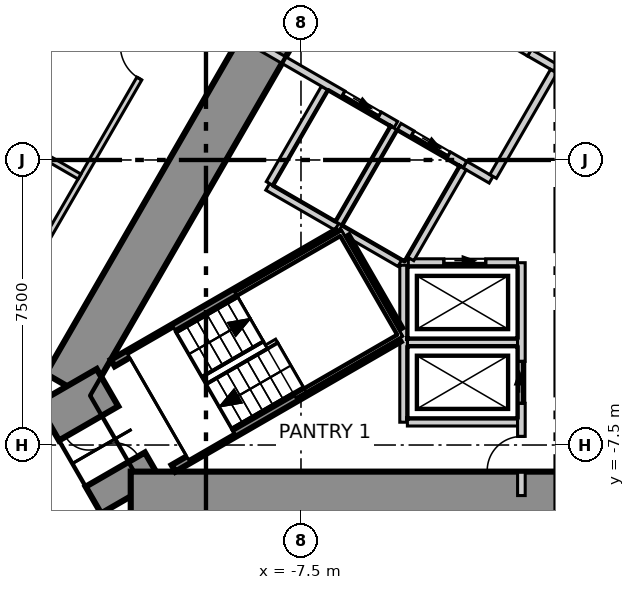
"""IFC4 building model, lengths in metres.
Left out: names, types, materials, properties, quantities, classifications, styles, units other than length and angle.
Written with IfcOpenShell. Run it as: python <this file> out.ifc"""

import sys

from ifc_helpers import new_model, si_unit, direction, frame, frame_2d, origin, place, context, subcontext, project, spatial, polyline, rectangle, outline, extrude, element, fill, save


model = new_model("IFC4")
c1 = context("Model", 3, precision=1e-05, world=origin(), true_north=direction((0.0, 1.0)))
c2 = subcontext(c1, "Body", "Model", "MODEL_VIEW")
j1 = project(units=[si_unit("LENGTHUNIT", "METRE"), si_unit("PLANEANGLEUNIT", "RADIAN")], contexts=[c1])
p1 = place(None, origin())
s1 = spatial("IfcSite", under=j1, at=p1, CompositionType="ELEMENT")
p2 = place(p1, origin())
s2 = spatial("IfcBuilding", under=s1, at=p2, CompositionType="ELEMENT")
p3 = place(p2, frame((0.0, 0.0, 99.8)))
s3 = spatial("IfcBuildingStorey", under=s2, at=p3, CompositionType="ELEMENT", Elevation=99.8)
p4 = place(p3, frame((-1.674, 14.8, -0.6), z_axis=(0.0, 0.0, 1.0), x_axis=(-0.499998822509, -0.866026083608, 0.0)))
e1 = element("IfcWall", 1, at=p4, inside=s3, PredefinedType="SHEAR", context=c2, shape_type="SweptSolid", body=[
    extrude(outline(polyline([(-0.664, -0.65), (1.281, -0.65), (3.226, -0.65), (5.172, -0.65), (7.117, -0.65), (9.062, -0.65), (11.007, -0.65), (12.953, -0.65), (14.898, -0.65), (16.843, -0.65), (18.788, -0.65), (20.734, -0.65), (22.679, -0.65), (24.624, -0.65), (23.296, 0.65), (21.41, 0.65), (19.524, 0.65), (17.638, 0.65), (15.752, 0.65), (13.866, 0.65), (11.98, 0.65), (10.094, 0.65), (8.208, 0.65), (6.322, 0.65), (4.436, 0.65), (2.55, 0.65), (0.664, 0.65), (-0.664, -0.65)])), origin(), (0.0, 0.0, 1.0), 4.8),
])
p5 = place(p4, frame((11.719, 0.0, 0.6)))
e2 = element("IfcOpeningElement", 2, at=p5, cuts=e1, PredefinedType="OPENING", context=c2, shape_type="SweptSolid", body=[
    extrude(rectangle(XDim=1.1, YDim=2.1, at=frame_2d((0.55, 1.05))), frame((0.0, 0.66, 0.0), z_axis=(0.0, -1.0, 0.0), x_axis=(1.0, 0.0, 0.0)), (0.0, 0.0, 1.0), 1.32),
])
p6 = place(p3, frame((-13.654, -5.95, -0.6), z_axis=(0.0, 0.0, 1.0), x_axis=(0.499926515799, -0.866067825751, 0.0)))
e3 = element("IfcWall", 3, at=p6, inside=s3, PredefinedType="SHEAR", context=c2, shape_type="SweptSolid", body=[
    extrude(outline(polyline([(-0.231, -0.9), (1.674, -0.9), (3.579, -0.9), (3.117, 0.9), (1.674, 0.9), (0.231, 0.9), (-0.231, -0.9)])), origin(), (0.0, 0.0, 1.0), 4.8),
])
p7 = place(p6, frame((1.134, 0.0, 0.6)))
e4 = element("IfcOpeningElement", 4, at=p7, cuts=e3, PredefinedType="OPENING", context=c2, shape_type="SweptSolid", body=[
    extrude(rectangle(XDim=1.4, YDim=2.1, at=frame_2d((0.7, 1.05))), frame((0.0, 0.91, 0.0), z_axis=(0.0, -1.0, 0.0), x_axis=(1.0, 0.0, 0.0)), (0.0, 0.0, 1.0), 1.82),
])
p8 = place(p3, frame((-11.98, -8.85, -0.6), z_axis=(0.0, 0.0, 1.0), x_axis=(1.0, 0.0, 0.0)))
e5 = element("IfcWall", 5, at=p8, inside=s3, PredefinedType="SHEAR", context=c2, shape_type="SweptSolid", body=[
    extrude(outline(polyline([(-0.664, -0.65), (1.281, -0.65), (3.226, -0.65), (5.172, -0.65), (7.117, -0.65), (9.062, -0.65), (11.007, -0.65), (12.953, -0.65), (14.898, -0.65), (16.843, -0.65), (18.788, -0.65), (20.734, -0.65), (22.679, -0.65), (24.624, -0.65), (23.296, 0.65), (21.41, 0.65), (19.524, 0.65), (17.638, 0.65), (15.752, 0.65), (13.866, 0.65), (11.98, 0.65), (10.094, 0.65), (8.208, 0.65), (6.322, 0.65), (4.436, 0.65), (2.55, 0.65), (0.664, 0.65), (-0.664, -0.65)])), origin(), (0.0, 0.0, 1.0), 4.8),
])
p9 = place(p3, frame((-3.217, 35.882, 0.0), z_axis=(0.0, 0.0, 1.0), x_axis=(-0.499995323711, -0.866028103624, 0.0)))
e6 = element("IfcWall", 6, at=p9, inside=s3, PredefinedType="ELEMENTEDWALL", context=c2, shape_type="SweptSolid", body=[
    extrude(rectangle(XDim=58.913, YDim=0.2, at=frame_2d((29.456, 0.0))), origin(), (0.0, 0.0, 1.0), 4.2),
])
p10 = place(p9, frame((2.023, 0.0, 0.6)))
e7 = element("IfcOpeningElement", 7, at=p10, cuts=e6, PredefinedType="OPENING", context=c2, shape_type="SweptSolid", body=[
    extrude(rectangle(XDim=5.6, YDim=3.0, at=frame_2d((2.8, 1.5))), frame((0.0, 0.11, 0.0), z_axis=(0.0, -1.0, 0.0), x_axis=(1.0, 0.0, 0.0)), (0.0, 0.0, 1.0), 0.22),
])
p11 = place(p9, frame((9.064, 0.0, 0.6)))
e8 = element("IfcOpeningElement", 8, at=p11, cuts=e6, PredefinedType="OPENING", context=c2, shape_type="SweptSolid", body=[
    extrude(rectangle(XDim=5.6, YDim=3.0, at=frame_2d((2.8, 1.5))), frame((0.0, 0.11, 0.0), z_axis=(0.0, -1.0, 0.0), x_axis=(1.0, 0.0, 0.0)), (0.0, 0.0, 1.0), 0.22),
])
p12 = place(p9, frame((16.105, 0.0, 0.6)))
e9 = element("IfcOpeningElement", 9, at=p12, cuts=e6, PredefinedType="OPENING", context=c2, shape_type="SweptSolid", body=[
    extrude(rectangle(XDim=5.6, YDim=3.0, at=frame_2d((2.8, 1.5))), frame((0.0, 0.11, 0.0), z_axis=(0.0, -1.0, 0.0), x_axis=(1.0, 0.0, 0.0)), (0.0, 0.0, 1.0), 0.22),
])
p13 = place(p9, frame((23.146, 0.0, 0.6)))
e10 = element("IfcOpeningElement", 10, at=p13, cuts=e6, PredefinedType="OPENING", context=c2, shape_type="SweptSolid", body=[
    extrude(rectangle(XDim=5.6, YDim=3.0, at=frame_2d((2.8, 1.5))), frame((0.0, 0.11, 0.0), z_axis=(0.0, -1.0, 0.0), x_axis=(1.0, 0.0, 0.0)), (0.0, 0.0, 1.0), 0.22),
])
p14 = place(p9, frame((30.186, 0.0, 0.6)))
e11 = element("IfcOpeningElement", 11, at=p14, cuts=e6, PredefinedType="OPENING", context=c2, shape_type="SweptSolid", body=[
    extrude(rectangle(XDim=5.6, YDim=3.0, at=frame_2d((2.8, 1.5))), frame((0.0, 0.11, 0.0), z_axis=(0.0, -1.0, 0.0), x_axis=(1.0, 0.0, 0.0)), (0.0, 0.0, 1.0), 0.22),
])
p15 = place(p9, frame((37.227, 0.0, 0.6)))
e12 = element("IfcOpeningElement", 12, at=p15, cuts=e6, PredefinedType="OPENING", context=c2, shape_type="SweptSolid", body=[
    extrude(rectangle(XDim=5.6, YDim=3.0, at=frame_2d((2.8, 1.5))), frame((0.0, 0.11, 0.0), z_axis=(0.0, -1.0, 0.0), x_axis=(1.0, 0.0, 0.0)), (0.0, 0.0, 1.0), 0.22),
])
p16 = place(p9, frame((44.268, 0.0, 0.6)))
e13 = element("IfcOpeningElement", 13, at=p16, cuts=e6, PredefinedType="OPENING", context=c2, shape_type="SweptSolid", body=[
    extrude(rectangle(XDim=5.6, YDim=3.0, at=frame_2d((2.8, 1.5))), frame((0.0, 0.11, 0.0), z_axis=(0.0, -1.0, 0.0), x_axis=(1.0, 0.0, 0.0)), (0.0, 0.0, 1.0), 0.22),
])
p17 = place(p9, frame((51.309, 0.0, 0.6)))
e14 = element("IfcOpeningElement", 14, at=p17, cuts=e6, PredefinedType="OPENING", context=c2, shape_type="SweptSolid", body=[
    extrude(rectangle(XDim=5.6, YDim=3.0, at=frame_2d((2.8, 1.5))), frame((0.0, 0.11, 0.0), z_axis=(0.0, -1.0, 0.0), x_axis=(1.0, 0.0, 0.0)), (0.0, 0.0, 1.0), 0.22),
])
p18 = place(p3, frame((-16.57, -6.2, 0.0), z_axis=(0.0, 0.0, 1.0), x_axis=(0.499993827443, 0.866028967483, 0.0)))
e15 = element("IfcWall", 15, at=p18, inside=s3, PredefinedType="PARTITIONING", context=c2, shape_type="SweptSolid", body=[
    extrude(rectangle(XDim=27.308, YDim=0.15, at=frame_2d((13.654, 0.0))), origin(), (0.0, 0.0, 1.0), 4.2),
])
p19 = place(p18, frame((23.402, 0.0, 0.0)))
e16 = element("IfcOpeningElement", 16, at=p19, cuts=e15, PredefinedType="OPENING", context=c2, shape_type="SweptSolid", body=[
    extrude(rectangle(XDim=1.2, YDim=2.1, at=frame_2d((0.6, 1.05))), frame((0.0, 0.085, 0.0), z_axis=(0.0, -1.0, 0.0), x_axis=(1.0, 0.0, 0.0)), (0.0, 0.0, 1.0), 0.17),
])
p20 = place(p18, frame((16.675, 0.0, 0.0)))
e17 = element("IfcOpeningElement", 17, at=p20, cuts=e15, PredefinedType="OPENING", context=c2, shape_type="SweptSolid", body=[
    extrude(rectangle(XDim=1.0, YDim=2.1, at=frame_2d((0.5, 1.05))), frame((0.0, 0.085, 0.0), z_axis=(0.0, -1.0, 0.0), x_axis=(1.0, 0.0, 0.0)), (0.0, 0.0, 1.0), 0.17),
])
p21 = place(p18, frame((9.634, 0.0, 0.0)))
e18 = element("IfcOpeningElement", 18, at=p21, cuts=e15, PredefinedType="OPENING", context=c2, shape_type="SweptSolid", body=[
    extrude(rectangle(XDim=1.0, YDim=2.1, at=frame_2d((0.5, 1.05))), frame((0.0, 0.085, 0.0), z_axis=(0.0, -1.0, 0.0), x_axis=(1.0, 0.0, 0.0)), (0.0, 0.0, 1.0), 0.17),
])
p22 = place(p18, frame((2.707, 0.0, 0.0)))
e19 = element("IfcOpeningElement", 19, at=p22, cuts=e15, PredefinedType="OPENING", context=c2, shape_type="SweptSolid", body=[
    extrude(rectangle(XDim=1.2, YDim=2.1, at=frame_2d((0.6, 1.05))), frame((0.0, 0.085, 0.0), z_axis=(0.0, -1.0, 0.0), x_axis=(1.0, 0.0, 0.0)), (0.0, 0.0, 1.0), 0.17),
])
p23 = place(p3, frame((-21.47, 4.266, 0.0), z_axis=(0.0, 0.0, 1.0), x_axis=(0.866010015463, -0.500026652407, 0.0)))
e20 = element("IfcWall", 20, at=p23, inside=s3, PredefinedType="PARTITIONING", context=c2, shape_type="SweptSolid", body=[
    extrude(rectangle(XDim=9.402, YDim=0.15, at=frame_2d((4.701, 0.0))), origin(), (0.0, 0.0, 1.0), 4.2),
])
p24 = place(p3, frame((-8.376, -0.707, 0.0), z_axis=(0.0, 0.0, 1.0), x_axis=(0.866067520717, -0.499927044236, 0.0)))
e21 = element("IfcWall", 21, at=p24, inside=s3, PredefinedType="SOLIDWALL", context=c2, shape_type="SweptSolid", body=[
    extrude(rectangle(XDim=2.1, YDim=0.2, at=frame_2d((1.05, 0.0))), origin(), (0.0, 0.0, 1.0), 4.2),
])
p25 = place(p3, frame((-8.326, -0.62, 0.0), z_axis=(0.0, 0.0, 1.0), x_axis=(0.500023687443, 0.866011727401, 0.0)))
e22 = element("IfcWall", 22, at=p25, inside=s3, PredefinedType="SOLIDWALL", context=c2, shape_type="SweptSolid", body=[
    extrude(rectangle(XDim=2.9, YDim=0.2, at=frame_2d((1.45, 0.0))), origin(), (0.0, 0.0, 1.0), 4.2),
])
p26 = place(p3, frame((-4.7, -4.8, 0.0), z_axis=(0.0, 0.0, 1.0), x_axis=(1.0, 0.0, 0.0)))
e23 = element("IfcWall", 23, at=p26, inside=s3, PredefinedType="SOLIDWALL", context=c2, shape_type="SweptSolid", body=[
    extrude(rectangle(XDim=2.9, YDim=0.2, at=frame_2d((1.45, 0.0))), origin(), (0.0, 0.0, 1.0), 4.2),
])
p27 = place(p3, frame((-4.8, -6.9, 0.0), z_axis=(0.0, 0.0, 1.0), x_axis=(0.0, 1.0, 0.0)))
e24 = element("IfcWall", 24, at=p27, inside=s3, PredefinedType="SOLIDWALL", context=c2, shape_type="SweptSolid", body=[
    extrude(rectangle(XDim=4.131, YDim=0.2, at=frame_2d((2.065, 0.0))), origin(), (0.0, 0.0, 1.0), 4.2),
])
p28 = place(p3, frame((-4.7, -6.9, 0.0), z_axis=(0.0, 0.0, 1.0), x_axis=(1.0, 0.0, 0.0)))
e25 = element("IfcWall", 25, at=p28, inside=s3, PredefinedType="SOLIDWALL", context=c2, shape_type="SweptSolid", body=[
    extrude(rectangle(XDim=2.9, YDim=0.2, at=frame_2d((1.45, 0.0))), origin(), (0.0, 0.0, 1.0), 4.2),
])
p29 = place(p3, frame((-1.7, -8.83, 0.0), z_axis=(0.0, 0.0, 1.0), x_axis=(0.0, 1.0, 0.0)))
e26 = element("IfcWall", 26, at=p29, inside=s3, PredefinedType="SOLIDWALL", context=c2, shape_type="SweptSolid", body=[
    extrude(rectangle(XDim=6.127, YDim=0.2, at=frame_2d((3.063, 0.0))), origin(), (0.0, 0.0, 1.0), 4.2),
])
p30 = place(p29, frame((2.43, 0.0, 0.0)))
e27 = element("IfcOpeningElement", 27, at=p30, cuts=e26, PredefinedType="OPENING", context=c2, shape_type="SweptSolid", body=[
    extrude(rectangle(XDim=1.1, YDim=2.1, at=frame_2d((0.55, 1.05))), frame((0.0, 0.11, 0.0), z_axis=(0.0, -1.0, 0.0), x_axis=(1.0, 0.0, 0.0)), (0.0, 0.0, 1.0), 0.22),
])
p31 = place(p29, frame((0.655, 0.0, 0.0)))
e28 = element("IfcOpeningElement", 28, at=p31, cuts=e26, PredefinedType="OPENING", context=c2, shape_type="SweptSolid", body=[
    extrude(rectangle(XDim=0.9, YDim=2.1, at=frame_2d((0.45, 1.05))), frame((0.0, 0.11, 0.0), z_axis=(0.0, -1.0, 0.0), x_axis=(1.0, 0.0, 0.0)), (0.0, 0.0, 1.0), 0.22),
])
p32 = place(p3, frame((-4.676, -2.7, 0.0), z_axis=(0.0, 0.0, 1.0), x_axis=(1.0, 0.0, 0.0)))
e29 = element("IfcWall", 29, at=p32, inside=s3, PredefinedType="SOLIDWALL", context=c2, shape_type="SweptSolid", body=[
    extrude(rectangle(XDim=2.873, YDim=0.2, at=frame_2d((1.437, 0.0))), origin(), (0.0, 0.0, 1.0), 4.2),
])
p33 = place(p32, frame((0.937, 0.0, 0.0)))
e30 = element("IfcOpeningElement", 30, at=p33, cuts=e29, PredefinedType="OPENING", context=c2, shape_type="SweptSolid", body=[
    extrude(rectangle(XDim=1.1, YDim=2.1, at=frame_2d((0.55, 1.05))), frame((0.0, 0.11, 0.0), z_axis=(0.0, -1.0, 0.0), x_axis=(1.0, 0.0, 0.0)), (0.0, 0.0, 1.0), 0.22),
])
p34 = place(p3, frame((-8.497, 2.943, 0.0), z_axis=(0.0, 0.0, 1.0), x_axis=(0.866036368755, -0.499981007633, 0.0)))
e31 = element("IfcWall", 31, at=p34, inside=s3, PredefinedType="SOLIDWALL", context=c2, shape_type="SweptSolid", body=[
    extrude(rectangle(XDim=4.032, YDim=0.2, at=frame_2d((2.016, 0.0))), origin(), (0.0, 0.0, 1.0), 4.2),
])
p35 = place(p34, frame((2.43, 0.0, 0.0)))
e32 = element("IfcOpeningElement", 32, at=p35, cuts=e31, PredefinedType="OPENING", context=c2, shape_type="SweptSolid", body=[
    extrude(rectangle(XDim=1.1, YDim=2.1, at=frame_2d((0.55, 1.05))), frame((0.0, 0.11, 0.0), z_axis=(0.0, -1.0, 0.0), x_axis=(1.0, 0.0, 0.0)), (0.0, 0.0, 1.0), 0.22),
])
p36 = place(p3, frame((-3.188, -0.122, 0.0), z_axis=(0.0, 0.0, 1.0), x_axis=(0.865705793592, -0.50055317294, 0.0)))
e33 = element("IfcWall", 33, at=p36, inside=s3, PredefinedType="SOLIDWALL", context=c2, shape_type="SweptSolid", body=[
    extrude(rectangle(XDim=0.797, YDim=0.2, at=frame_2d((0.398, 0.0))), origin(), (0.0, 0.0, 1.0), 4.2),
])
p37 = place(p3, frame((-1.488, 2.822, 0.0), z_axis=(0.0, 0.0, 1.0), x_axis=(0.866236612152, -0.499633997809, 0.0)))
e34 = element("IfcWall", 34, at=p37, inside=s3, PredefinedType="SOLIDWALL", context=c2, shape_type="SweptSolid", body=[
    extrude(rectangle(XDim=0.796, YDim=0.2, at=frame_2d((0.398, 0.0))), origin(), (0.0, 0.0, 1.0), 4.2),
])
p38 = place(p3, frame((-2.444, -0.433, 0.0), z_axis=(0.0, 0.0, 1.0), x_axis=(0.500035624827, 0.866004834804, 0.0)))
e35 = element("IfcWall", 35, at=p38, inside=s3, PredefinedType="SOLIDWALL", context=c2, shape_type="SweptSolid", body=[
    extrude(rectangle(XDim=3.194, YDim=0.2, at=frame_2d((1.597, 0.0))), origin(), (0.0, 0.0, 1.0), 4.2),
])
p39 = place(p3, frame((-6.507, -1.67, 0.0), z_axis=(0.0, 0.0, 1.0), x_axis=(0.50012328804, 0.865954211699, 0.0)))
e36 = element("IfcWall", 36, at=p39, inside=s3, PredefinedType="SOLIDWALL", context=c2, shape_type="SweptSolid", body=[
    extrude(rectangle(XDim=2.9, YDim=0.2, at=frame_2d((1.45, 0.0))), origin(), (0.0, 0.0, 1.0), 4.2),
])
p40 = place(p3, frame((-6.47, -1.807, 0.0), z_axis=(0.0, 0.0, 1.0), x_axis=(0.865883195159, -0.500246231712, 0.0)))
e37 = element("IfcWall", 37, at=p40, inside=s3, PredefinedType="SOLIDWALL", context=c2, shape_type="SweptSolid", body=[
    extrude(rectangle(XDim=1.815, YDim=0.2, at=frame_2d((0.908, 0.0))), origin(), (0.0, 0.0, 1.0), 4.2),
])
p41 = place(p3, frame((-4.92, 0.878, 0.0), z_axis=(0.0, 0.0, 1.0), x_axis=(0.866010750942, -0.50002537861, 0.0)))
e38 = element("IfcWall", 38, at=p41, inside=s3, PredefinedType="SOLIDWALL", context=c2, shape_type="SweptSolid", body=[
    extrude(rectangle(XDim=2.0, YDim=0.2, at=frame_2d((1.0, 0.0))), origin(), (0.0, 0.0, 1.0), 4.2),
])
p42 = place(p41, frame((0.4, 0.0, 0.0)))
e39 = element("IfcOpeningElement", 39, at=p42, cuts=e38, PredefinedType="OPENING", context=c2, shape_type="SweptSolid", body=[
    extrude(rectangle(XDim=1.1, YDim=2.1, at=frame_2d((0.55, 1.05))), frame((0.0, 0.11, 0.0), z_axis=(0.0, -1.0, 0.0), x_axis=(1.0, 0.0, 0.0)), (0.0, 0.0, 1.0), 0.22),
])
p43 = place(p3, frame((-4.619, -2.6, 0.0), z_axis=(0.0, 0.0, 1.0), x_axis=(0.50009492287, 0.865970593103, 0.0)))
e40 = element("IfcWall", 40, at=p43, inside=s3, PredefinedType="SOLIDWALL", context=c2, shape_type="SweptSolid", body=[
    extrude(rectangle(XDim=2.761, YDim=0.2, at=frame_2d((1.381, 0.0))), origin(), (0.0, 0.0, 1.0), 4.2),
])
p44 = place(p3, frame((-3.309, 3.873, 0.0), z_axis=(0.0, 0.0, 1.0), x_axis=(0.866098583652, -0.499873227325, 0.0)))
e41 = element("IfcWall", 41, at=p44, inside=s3, PredefinedType="SOLIDWALL", context=c2, shape_type="SweptSolid", body=[
    extrude(rectangle(XDim=2.103, YDim=0.2, at=frame_2d((1.051, 0.0))), origin(), (0.0, 0.0, 1.0), 4.2),
])
p45 = place(p44, frame((0.502, 0.0, 0.0)))
e42 = element("IfcOpeningElement", 42, at=p45, cuts=e41, PredefinedType="OPENING", context=c2, shape_type="SweptSolid", body=[
    extrude(rectangle(XDim=1.1, YDim=2.1, at=frame_2d((0.55, 1.05))), frame((0.0, 0.11, 0.0), z_axis=(0.0, -1.0, 0.0), x_axis=(1.0, 0.0, 0.0)), (0.0, 0.0, 1.0), 0.22),
])
p46 = place(p3, frame((-12.452, -5.342, 0.0), z_axis=(0.0, 0.0, 1.0), x_axis=(0.866002488145, 0.500039688951, 0.0)))
e43 = element("IfcWall", 43, at=p46, inside=s3, PredefinedType="SOLIDWALL", context=c2, shape_type="SweptSolid", body=[
    extrude(rectangle(XDim=6.839, YDim=0.2, at=frame_2d((3.42, 0.0))), origin(), (0.0, 0.0, 1.0), 4.2),
])
p47 = place(p3, frame((-6.329, -2.038, 0.0), z_axis=(0.0, 0.0, 1.0), x_axis=(0.500200581029, -0.865909567298, 0.0)))
e44 = element("IfcWall", 44, at=p47, inside=s3, PredefinedType="SOLIDWALL", context=c2, shape_type="SweptSolid", body=[
    extrude(rectangle(XDim=2.799, YDim=0.2, at=frame_2d((1.399, 0.0))), origin(), (0.0, 0.0, 1.0), 4.2),
])
p48 = place(p3, frame((-10.853, -8.113, 0.0), z_axis=(0.0, 0.0, 1.0), x_axis=(0.866047105788, 0.499962409144, 0.0)))
e45 = element("IfcWall", 45, at=p48, inside=s3, PredefinedType="SOLIDWALL", context=c2, shape_type="SweptSolid", body=[
    extrude(rectangle(XDim=6.84, YDim=0.2, at=frame_2d((3.42, 0.0))), origin(), (0.0, 0.0, 1.0), 4.2),
])
p49 = place(p33, origin())
e46 = element("IfcDoor", 46, at=p49, inside=s3, OperationType="SLIDING_TO_LEFT", PredefinedType="DOOR", context=c2, shape_type="SweptSolid", body=[
    extrude(rectangle(XDim=1.1, YDim=2.1, at=frame_2d((0.55, 1.05))), frame((0.0, 0.025, 0.0), z_axis=(0.0, -1.0, 0.0), x_axis=(1.0, 0.0, 0.0)), (0.0, 0.0, 1.0), 0.05),
])
fill(e30, e46)
p50 = place(p30, origin())
e47 = element("IfcDoor", 47, at=p50, inside=s3, OperationType="SLIDING_TO_LEFT", PredefinedType="DOOR", context=c2, shape_type="SweptSolid", body=[
    extrude(rectangle(XDim=1.1, YDim=2.1, at=frame_2d((0.55, 1.05))), frame((0.0, 0.025, 0.0), z_axis=(0.0, -1.0, 0.0), x_axis=(1.0, 0.0, 0.0)), (0.0, 0.0, 1.0), 0.05),
])
fill(e27, e47)
p51 = place(p42, origin())
e48 = element("IfcDoor", 48, at=p51, inside=s3, OperationType="SLIDING_TO_LEFT", PredefinedType="DOOR", context=c2, shape_type="SweptSolid", body=[
    extrude(rectangle(XDim=1.1, YDim=2.1, at=frame_2d((0.55, 1.05))), frame((0.0, 0.025, 0.0), z_axis=(0.0, -1.0, 0.0), x_axis=(1.0, 0.0, 0.0)), (0.0, 0.0, 1.0), 0.05),
])
fill(e39, e48)
p52 = place(p35, origin())
e49 = element("IfcDoor", 49, at=p52, inside=s3, OperationType="SLIDING_TO_LEFT", PredefinedType="DOOR", context=c2, shape_type="SweptSolid", body=[
    extrude(rectangle(XDim=1.1, YDim=2.1, at=frame_2d((0.55, 1.05))), frame((0.0, 0.025, 0.0), z_axis=(0.0, -1.0, 0.0), x_axis=(1.0, 0.0, 0.0)), (0.0, 0.0, 1.0), 0.05),
])
fill(e32, e49)
p53 = place(p21, origin())
e50 = element("IfcDoor", 50, at=p53, inside=s3, OperationType="SINGLE_SWING_LEFT", PredefinedType="DOOR", context=c2, shape_type="SweptSolid", body=[
    extrude(rectangle(XDim=1.0, YDim=2.1, at=frame_2d((0.5, 1.05))), frame((0.0, 0.025, 0.0), z_axis=(0.0, -1.0, 0.0), x_axis=(1.0, 0.0, 0.0)), (0.0, 0.0, 1.0), 0.05),
])
fill(e18, e50)
p54 = place(p7, origin())
e51 = element("IfcDoor", 51, at=p54, inside=s3, OperationType="DOUBLE_DOOR_SINGLE_SWING", PredefinedType="DOOR", context=c2, shape_type="SweptSolid", body=[
    extrude(rectangle(XDim=1.4, YDim=2.1, at=frame_2d((0.7, 1.05))), frame((0.0, 0.025, 0.0), z_axis=(0.0, -1.0, 0.0), x_axis=(1.0, 0.0, 0.0)), (0.0, 0.0, 1.0), 0.05),
])
fill(e4, e51)
p55 = place(p31, origin())
e52 = element("IfcDoor", 52, at=p55, inside=s3, OperationType="SINGLE_SWING_RIGHT", PredefinedType="DOOR", context=c2, shape_type="SweptSolid", body=[
    extrude(rectangle(XDim=0.9, YDim=2.1, at=frame_2d((0.45, 1.05))), frame((0.0, 0.025, 0.0), z_axis=(0.0, -1.0, 0.0), x_axis=(1.0, 0.0, 0.0)), (0.0, 0.0, 1.0), 0.05),
])
fill(e28, e52)
save(model, sys.argv[1])
